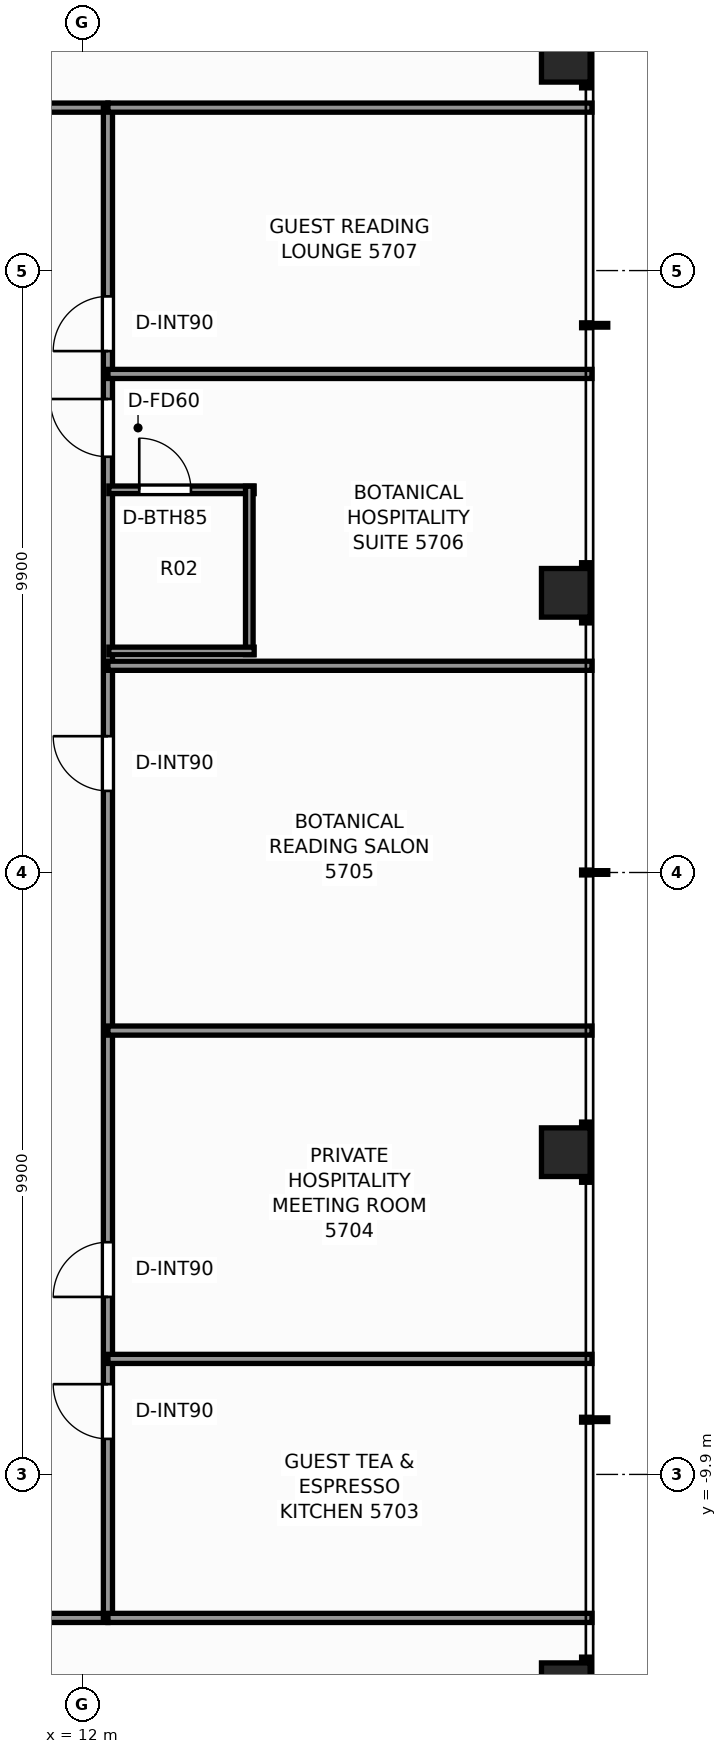
"""IFC4 building model, lengths in metres.
Left out: names, types, materials, properties, quantities, classifications, styles, units other than length and angle.
Written with IfcOpenShell. Run it as: python <this file> out.ifc"""

import sys

from ifc_helpers import new_model, si_unit, direction, frame, frame_2d, origin, origin_2d, place, context, subcontext, project, spatial, rectangle, extrude, element, fill, save


model = new_model("IFC4")
c1 = context("Model", 3, precision=1e-05, world=origin(), true_north=direction((0.0, 1.0)))
c2 = subcontext(c1, "Body", "Model", "MODEL_VIEW")
j1 = project(units=[si_unit("LENGTHUNIT", "METRE"), si_unit("PLANEANGLEUNIT", "RADIAN")], contexts=[c1])
p1 = place(None, origin())
s1 = spatial("IfcSite", under=j1, at=p1, CompositionType="ELEMENT")
p2 = place(p1, origin())
s2 = spatial("IfcBuilding", under=s1, at=p2, CompositionType="ELEMENT")
p3 = place(p2, frame((0.0, 0.0, 196.5)))
s3 = spatial("IfcBuildingStorey", under=s2, at=p3, CompositionType="ELEMENT", Elevation=196.5)
for number, where, z_axis, x_axis in (
    (1, (19.95, -13.4, 0.0), (0.0, 0.0, 1.0), (1.0, 0.0, 0.0)),
    (2, (19.95, -4.6, 0.0), (0.0, 0.0, 1.0), (1.0, 0.0, 0.0)),
    (3, (19.95, 4.6, 0.0), (0.0, 0.0, 1.0), (1.0, 0.0, 0.0)),
    (4, (19.95, 13.4, 0.0), (0.0, 0.0, 1.0), (1.0, 0.0, 0.0)),
):
    element("IfcColumn", number, at=place(p3, frame(where, z_axis=z_axis, x_axis=x_axis)), inside=s3, PredefinedType="COLUMN", context=c2, shape_type="SweptSolid", body=[
        extrude(rectangle(XDim=0.8, YDim=0.8, at=origin_2d()), origin(), (0.0, 0.0, 1.0), 3.3),
    ])
p4 = place(p3, frame((-12.42, -12.26, 0.0), z_axis=(0.0, 0.0, 1.0), x_axis=(1.0, 0.0, 0.0)))
e5 = element("IfcWall", 5, at=p4, inside=s3, PredefinedType="PARTITIONING", context=c2, shape_type="SweptSolid", body=[
    extrude(rectangle(XDim=24.84, YDim=0.15, at=frame_2d((12.42, 0.0))), origin(), (0.0, 0.0, 1.0), 2.369),
])
p5 = place(p4, frame((4.435, 0.0, 0.0)))
e6 = element("IfcOpeningElement", 6, at=p5, cuts=e5, PredefinedType="OPENING", context=c2, shape_type="SweptSolid", body=[
    extrude(rectangle(XDim=0.9, YDim=2.06, at=frame_2d((0.45, 1.03))), frame((0.0, 0.085, 0.0), z_axis=(0.0, -1.0, 0.0), x_axis=(1.0, 0.0, 0.0)), (0.0, 0.0, 1.0), 0.17),
])
p6 = place(p4, frame((19.505, 0.0, 0.0)))
e7 = element("IfcOpeningElement", 7, at=p6, cuts=e5, PredefinedType="OPENING", context=c2, shape_type="SweptSolid", body=[
    extrude(rectangle(XDim=0.9, YDim=2.06, at=frame_2d((0.45, 1.03))), frame((0.0, 0.085, 0.0), z_axis=(0.0, -1.0, 0.0), x_axis=(1.0, 0.0, 0.0)), (0.0, 0.0, 1.0), 0.17),
])
p7 = place(p3, frame((-12.42, 12.58, 0.0), z_axis=(0.0, 0.0, 1.0), x_axis=(1.0, 0.0, 0.0)))
e8 = element("IfcWall", 8, at=p7, inside=s3, PredefinedType="PARTITIONING", context=c2, shape_type="SweptSolid", body=[
    extrude(rectangle(XDim=24.84, YDim=0.15, at=frame_2d((12.42, 0.0))), origin(), (0.0, 0.0, 1.0), 2.369),
])
p8 = place(p7, frame((4.435, 0.0, 0.0)))
e9 = element("IfcOpeningElement", 9, at=p8, cuts=e8, PredefinedType="OPENING", context=c2, shape_type="SweptSolid", body=[
    extrude(rectangle(XDim=0.9, YDim=2.06, at=frame_2d((0.45, 1.03))), frame((0.0, 0.085, 0.0), z_axis=(0.0, -1.0, 0.0), x_axis=(1.0, 0.0, 0.0)), (0.0, 0.0, 1.0), 0.17),
])
p9 = place(p7, frame((19.505, 0.0, 0.0)))
e10 = element("IfcOpeningElement", 10, at=p9, cuts=e8, PredefinedType="OPENING", context=c2, shape_type="SweptSolid", body=[
    extrude(rectangle(XDim=0.9, YDim=2.06, at=frame_2d((0.45, 1.03))), frame((0.0, 0.085, 0.0), z_axis=(0.0, -1.0, 0.0), x_axis=(1.0, 0.0, 0.0)), (0.0, 0.0, 1.0), 0.17),
])
p10 = place(p3, frame((12.42, -12.26, 0.0), z_axis=(0.0, 0.0, 1.0), x_axis=(0.0, 1.0, 0.0)))
e11 = element("IfcWall", 11, at=p10, inside=s3, PredefinedType="PARTITIONING", context=c2, shape_type="SweptSolid", body=[
    extrude(rectangle(XDim=24.84, YDim=0.15, at=frame_2d((12.42, 0.0))), origin(), (0.0, 0.0, 1.0), 2.369),
])
p11 = place(p10, frame((2.944, 0.0, 0.0)))
e12 = element("IfcOpeningElement", 12, at=p11, cuts=e11, PredefinedType="OPENING", context=c2, shape_type="SweptSolid", body=[
    extrude(rectangle(XDim=0.9, YDim=2.06, at=frame_2d((0.45, 1.03))), frame((0.0, 0.085, 0.0), z_axis=(0.0, -1.0, 0.0), x_axis=(1.0, 0.0, 0.0)), (0.0, 0.0, 1.0), 0.17),
])
p12 = place(p10, frame((5.279, 0.0, 0.0)))
e13 = element("IfcOpeningElement", 13, at=p12, cuts=e11, PredefinedType="OPENING", context=c2, shape_type="SweptSolid", body=[
    extrude(rectangle(XDim=0.9, YDim=2.06, at=frame_2d((0.45, 1.03))), frame((0.0, 0.085, 0.0), z_axis=(0.0, -1.0, 0.0), x_axis=(1.0, 0.0, 0.0)), (0.0, 0.0, 1.0), 0.17),
])
p13 = place(p10, frame((13.602, 0.0, 0.0)))
e14 = element("IfcOpeningElement", 14, at=p13, cuts=e11, PredefinedType="OPENING", context=c2, shape_type="SweptSolid", body=[
    extrude(rectangle(XDim=0.9, YDim=2.06, at=frame_2d((0.45, 1.03))), frame((0.0, 0.085, 0.0), z_axis=(0.0, -1.0, 0.0), x_axis=(1.0, 0.0, 0.0)), (0.0, 0.0, 1.0), 0.17),
])
p14 = place(p10, frame((19.098, 0.0, 0.0)))
e15 = element("IfcOpeningElement", 15, at=p14, cuts=e11, PredefinedType="OPENING", context=c2, shape_type="SweptSolid", body=[
    extrude(rectangle(XDim=0.95, YDim=2.06, at=frame_2d((0.475, 1.03))), frame((0.0, 0.085, 0.0), z_axis=(0.0, -1.0, 0.0), x_axis=(1.0, 0.0, 0.0)), (0.0, 0.0, 1.0), 0.17),
])
p15 = place(p10, frame((20.836, 0.0, 0.0)))
e16 = element("IfcOpeningElement", 16, at=p15, cuts=e11, PredefinedType="OPENING", context=c2, shape_type="SweptSolid", body=[
    extrude(rectangle(XDim=0.9, YDim=2.06, at=frame_2d((0.45, 1.03))), frame((0.0, 0.085, 0.0), z_axis=(0.0, -1.0, 0.0), x_axis=(1.0, 0.0, 0.0)), (0.0, 0.0, 1.0), 0.17),
])
for number, where, z_axis, x_axis in (
    (17, (12.42, -12.26, 0.0), (0.0, 0.0, 1.0), (1.0, 0.0, 0.0)),
    (18, (12.42, 12.58, 0.0), (0.0, 0.0, 1.0), (1.0, 0.0, 0.0)),
):
    element("IfcWall", number, at=place(p3, frame(where, z_axis=z_axis, x_axis=x_axis)), inside=s3, PredefinedType="PARTITIONING", context=c2, shape_type="SweptSolid", body=[
        extrude(rectangle(XDim=7.96, YDim=0.15, at=frame_2d((3.98, 0.0))), origin(), (0.0, 0.0, 1.0), 2.369),
    ])
for number, where, z_axis, x_axis in (
    (19, (12.42, -8.0, 0.0), (0.0, 0.0, 1.0), (1.0, 0.0, 0.0)),
    (20, (12.42, -2.6, 0.0), (0.0, 0.0, 1.0), (1.0, 0.0, 0.0)),
    (21, (12.42, 3.4, 0.0), (0.0, 0.0, 1.0), (1.0, 0.0, 0.0)),
    (22, (12.42, 8.2, 0.0), (0.0, 0.0, 1.0), (1.0, 0.0, 0.0)),
):
    element("IfcWall", number, at=place(p3, frame(where, z_axis=z_axis, x_axis=x_axis)), inside=s3, PredefinedType="PARTITIONING", context=c2, shape_type="SweptSolid", body=[
        extrude(rectangle(XDim=7.96, YDim=0.15, at=frame_2d((3.98, 0.0))), origin(), (0.0, 0.0, 1.0), 2.453),
    ])
p16 = place(p3, frame((12.435, 6.294, 0.0), z_axis=(0.0, 0.0, 1.0), x_axis=(1.0, 0.0, 0.0)))
e23 = element("IfcWall", 23, at=p16, inside=s3, PredefinedType="PARTITIONING", context=c2, shape_type="SweptSolid", body=[
    extrude(rectangle(XDim=2.39, YDim=0.125, at=frame_2d((1.195, 0.0))), origin(), (0.0, 0.0, 1.0), 3.08),
])
p17 = place(p16, frame((0.5, 0.0, 0.0)))
e24 = element("IfcOpeningElement", 24, at=p17, cuts=e23, PredefinedType="OPENING", context=c2, shape_type="SweptSolid", body=[
    extrude(rectangle(XDim=0.85, YDim=2.03, at=frame_2d((0.425, 1.015))), frame((0.0, 0.073, 0.0), z_axis=(0.0, -1.0, 0.0), x_axis=(1.0, 0.0, 0.0)), (0.0, 0.0, 1.0), 0.145),
])
p18 = place(p3, frame((14.745, 3.584, 0.0), z_axis=(0.0, 0.0, 1.0), x_axis=(0.0, 1.0, 0.0)))
e25 = element("IfcWall", 25, at=p18, inside=s3, PredefinedType="PARTITIONING", context=c2, shape_type="SweptSolid", body=[
    extrude(rectangle(XDim=2.77, YDim=0.125, at=frame_2d((1.385, 0.0))), origin(), (0.0, 0.0, 1.0), 2.369),
])
p19 = place(p3, frame((12.435, 3.644, 0.0), z_axis=(0.0, 0.0, 1.0), x_axis=(1.0, 0.0, 0.0)))
e26 = element("IfcWall", 26, at=p19, inside=s3, PredefinedType="PARTITIONING", context=c2, shape_type="SweptSolid", body=[
    extrude(rectangle(XDim=2.39, YDim=0.125, at=frame_2d((1.195, 0.0))), origin(), (0.0, 0.0, 1.0), 3.08),
])
p20 = place(p11, origin())
e27 = element("IfcDoor", 27, at=p20, inside=s3, OperationType="SINGLE_SWING_RIGHT", PredefinedType="DOOR", context=c2, shape_type="SweptSolid", body=[
    extrude(rectangle(XDim=0.9, YDim=2.06, at=frame_2d((0.45, 1.03))), frame((0.0, 0.025, 0.0), z_axis=(0.0, -1.0, 0.0), x_axis=(1.0, 0.0, 0.0)), (0.0, 0.0, 1.0), 0.05),
])
fill(e12, e27)
p21 = place(p12, origin())
e28 = element("IfcDoor", 28, at=p21, inside=s3, OperationType="SINGLE_SWING_LEFT", PredefinedType="DOOR", context=c2, shape_type="SweptSolid", body=[
    extrude(rectangle(XDim=0.9, YDim=2.06, at=frame_2d((0.45, 1.03))), frame((0.0, 0.025, 0.0), z_axis=(0.0, -1.0, 0.0), x_axis=(1.0, 0.0, 0.0)), (0.0, 0.0, 1.0), 0.05),
])
fill(e13, e28)
p22 = place(p13, origin())
e29 = element("IfcDoor", 29, at=p22, inside=s3, OperationType="SINGLE_SWING_RIGHT", PredefinedType="DOOR", context=c2, shape_type="SweptSolid", body=[
    extrude(rectangle(XDim=0.9, YDim=2.06, at=frame_2d((0.45, 1.03))), frame((0.0, 0.025, 0.0), z_axis=(0.0, -1.0, 0.0), x_axis=(1.0, 0.0, 0.0)), (0.0, 0.0, 1.0), 0.05),
])
fill(e14, e29)
p23 = place(p17, origin())
e30 = element("IfcDoor", 30, at=p23, inside=s3, OperationType="SINGLE_SWING_LEFT", PredefinedType="DOOR", context=c2, shape_type="SweptSolid", body=[
    extrude(rectangle(XDim=0.85, YDim=2.03, at=frame_2d((0.425, 1.015))), frame((0.0, 0.025, 0.0), z_axis=(0.0, -1.0, 0.0), x_axis=(1.0, 0.0, 0.0)), (0.0, 0.0, 1.0), 0.05),
])
fill(e24, e30)
p24 = place(p14, origin())
e31 = element("IfcDoor", 31, at=p24, inside=s3, OperationType="SINGLE_SWING_RIGHT", PredefinedType="DOOR", context=c2, shape_type="SweptSolid", body=[
    extrude(rectangle(XDim=0.95, YDim=2.06, at=frame_2d((0.475, 1.03))), frame((0.0, 0.025, 0.0), z_axis=(0.0, -1.0, 0.0), x_axis=(1.0, 0.0, 0.0)), (0.0, 0.0, 1.0), 0.05),
])
fill(e15, e31)
p25 = place(p15, origin())
e32 = element("IfcDoor", 32, at=p25, inside=s3, OperationType="SINGLE_SWING_LEFT", PredefinedType="DOOR", context=c2, shape_type="SweptSolid", body=[
    extrude(rectangle(XDim=0.9, YDim=2.06, at=frame_2d((0.45, 1.03))), frame((0.0, 0.025, 0.0), z_axis=(0.0, -1.0, 0.0), x_axis=(1.0, 0.0, 0.0)), (0.0, 0.0, 1.0), 0.05),
])
fill(e16, e32)
save(model, sys.argv[1])
